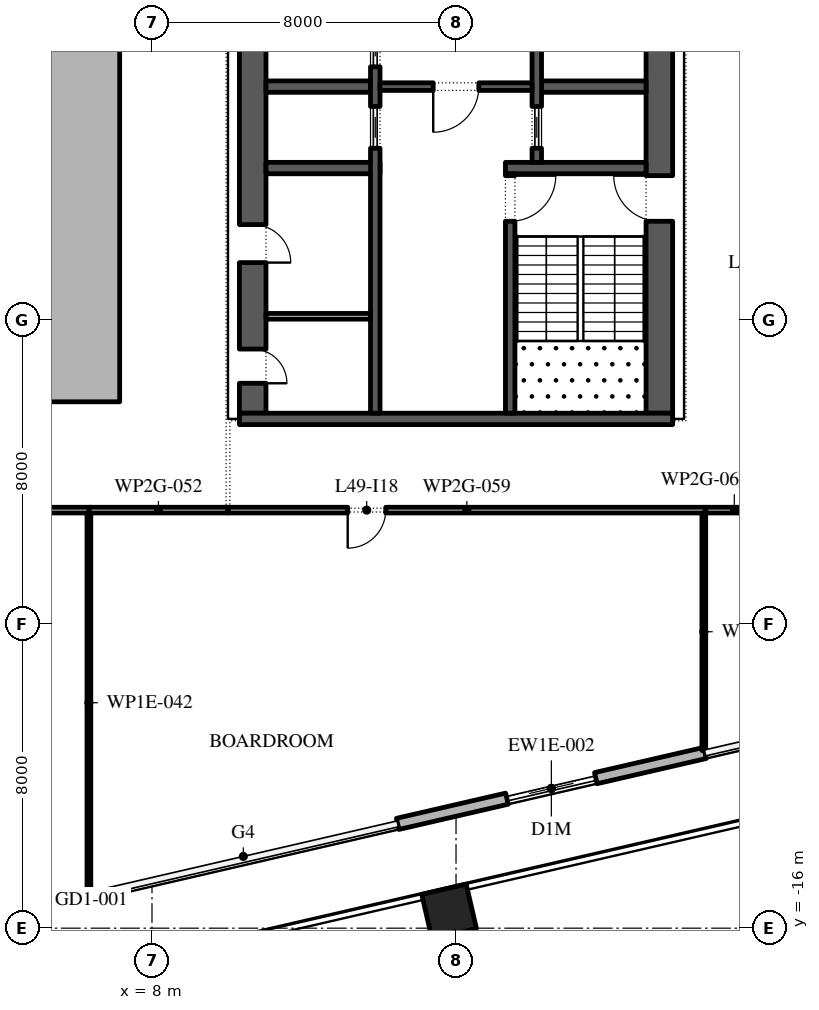
"""IFC4 building model, lengths in metres.
Left out: names, types, materials, properties, quantities, classifications, styles, units other than length and angle.
Written with IfcOpenShell. Run it as: python <this file> out.ifc"""

import sys

from ifc_helpers import new_model, si_unit, direction, frame, frame_2d, origin, origin_2d, place, context, subcontext, project, spatial, polyline, rectangle, outline, extrude, element, fill, save


model = new_model("IFC4")
c1 = context("Model", 3, precision=1e-05, world=origin(), true_north=direction((0.0, 1.0)))
c2 = subcontext(c1, "Body", "Model", "MODEL_VIEW")
j1 = project(units=[si_unit("LENGTHUNIT", "METRE"), si_unit("PLANEANGLEUNIT", "RADIAN")], contexts=[c1])
p1 = place(None, origin())
s1 = spatial("IfcSite", under=j1, at=p1, CompositionType="ELEMENT")
p2 = place(p1, origin())
s2 = spatial("IfcBuilding", under=s1, at=p2, CompositionType="ELEMENT")
p3 = place(p2, frame((0.0, 0.0, 222.0)))
s3 = spatial("IfcBuildingStorey", under=s2, at=p3, CompositionType="ELEMENT", Elevation=222.0)
p4 = place(p3, frame((15.818, -15.561, 0.0), z_axis=(0.0, 0.0, 1.0), x_axis=(0.974370064785, 0.224951054344, 0.0)))
e1 = element("IfcColumn", 1, at=p4, inside=s3, PredefinedType="COLUMN", context=c2, shape_type="SweptSolid", body=[
    extrude(rectangle(XDim=1.2, YDim=1.2, at=origin_2d()), origin(), (0.0, 0.0, 1.0), 4.2),
])
p5 = place(p3, origin())
e2 = element("IfcWall", 2, at=p5, inside=s3, PredefinedType="STANDARD", context=c2, shape_type="SweptSolid", body=[
    extrude(outline(polyline([(-7.15, -2.15), (7.15, -2.15), (7.15, 16.15), (-7.15, 16.15), (-7.15, -2.15)]), holes=[polyline([(-7.0, -2.0), (-7.0, 16.0), (7.0, 16.0), (7.0, -2.0), (-7.0, -2.0)])]), origin(), (0.0, 0.0, 1.0), 3.75),
])
p6 = place(p3, frame((14.465, -13.256, 0.0), z_axis=(0.0, 0.0, 1.0), x_axis=(0.974368386566, 0.224958323385, 0.0)))
e3 = element("IfcWall", 3, at=p6, inside=s3, PredefinedType="STANDARD", context=c2, shape_type="SweptSolid", body=[
    extrude(rectangle(XDim=8.3, YDim=0.3, at=frame_2d((4.15, 0.0))), origin(), (0.0, 0.0, 1.0), 3.75),
])
p7 = place(p6, frame((2.95, 0.0, 0.0)))
e4 = element("IfcOpeningElement", 4, at=p7, cuts=e3, PredefinedType="OPENING", context=c2, shape_type="SweptSolid", body=[
    extrude(rectangle(XDim=2.4, YDim=3.025, at=frame_2d((1.2, 1.512))), frame((0.0, 0.16, 0.0), z_axis=(0.0, -1.0, 0.0), x_axis=(1.0, 0.0, 0.0)), (0.0, 0.0, 1.0), 0.32),
])
p8 = place(p3, frame((33.157, -5.092, 0.0), z_axis=(0.0, 0.0, 1.0), x_axis=(-0.224950279389, 0.974370243697, 0.0)))
e5 = element("IfcWall", 5, at=p8, inside=s3, PredefinedType="STANDARD", context=c2, shape_type="SweptSolid", body=[
    extrude(rectangle(XDim=49.5, YDim=0.3, at=frame_2d((24.75, 0.0))), origin(), (0.0, 0.0, 1.0), 3.75),
])
p9 = place(p8, frame((2.207, 0.0, 0.0)))
e6 = element("IfcOpeningElement", 6, at=p9, cuts=e5, PredefinedType="OPENING", context=c2, shape_type="SweptSolid", body=[
    extrude(rectangle(XDim=2.4, YDim=2.875, at=frame_2d((1.2, 1.438))), frame((0.0, 0.16, 0.0), z_axis=(0.0, -1.0, 0.0), x_axis=(1.0, 0.0, 0.0)), (0.0, 0.0, 1.0), 0.32),
])
p10 = place(p8, frame((7.871, 0.0, 0.45)))
e7 = element("IfcOpeningElement", 7, at=p10, cuts=e5, PredefinedType="OPENING", context=c2, shape_type="SweptSolid", body=[
    extrude(rectangle(XDim=5.0, YDim=2.575, at=frame_2d((2.5, 1.288))), frame((0.0, 0.16, 0.0), z_axis=(0.0, -1.0, 0.0), x_axis=(1.0, 0.0, 0.0)), (0.0, 0.0, 1.0), 0.32),
])
p11 = place(p8, frame((14.986, 0.0, 0.45)))
e8 = element("IfcOpeningElement", 8, at=p11, cuts=e5, PredefinedType="OPENING", context=c2, shape_type="SweptSolid", body=[
    extrude(rectangle(XDim=5.0, YDim=2.625, at=frame_2d((2.5, 1.312))), frame((0.0, 0.16, 0.0), z_axis=(0.0, -1.0, 0.0), x_axis=(1.0, 0.0, 0.0)), (0.0, 0.0, 1.0), 0.32),
])
p12 = place(p8, frame((22.1, 0.0, 0.45)))
e9 = element("IfcOpeningElement", 9, at=p12, cuts=e5, PredefinedType="OPENING", context=c2, shape_type="SweptSolid", body=[
    extrude(rectangle(XDim=5.0, YDim=2.75, at=frame_2d((2.5, 1.375))), frame((0.0, 0.16, 0.0), z_axis=(0.0, -1.0, 0.0), x_axis=(1.0, 0.0, 0.0)), (0.0, 0.0, 1.0), 0.32),
])
p13 = place(p8, frame((30.514, 0.0, 0.0)))
e10 = element("IfcOpeningElement", 10, at=p13, cuts=e5, PredefinedType="OPENING", context=c2, shape_type="SweptSolid", body=[
    extrude(rectangle(XDim=2.4, YDim=3.2, at=frame_2d((1.2, 1.6))), frame((0.0, 0.16, 0.0), z_axis=(0.0, -1.0, 0.0), x_axis=(1.0, 0.0, 0.0)), (0.0, 0.0, 1.0), 0.32),
])
p14 = place(p8, frame((36.329, 0.0, 0.45)))
e11 = element("IfcOpeningElement", 11, at=p14, cuts=e5, PredefinedType="OPENING", context=c2, shape_type="SweptSolid", body=[
    extrude(rectangle(XDim=5.0, YDim=3.25, at=frame_2d((2.5, 1.625))), frame((0.0, 0.16, 0.0), z_axis=(0.0, -1.0, 0.0), x_axis=(1.0, 0.0, 0.0)), (0.0, 0.0, 1.0), 0.32),
])
p15 = place(p8, frame((43.443, 0.0, 0.45)))
e12 = element("IfcOpeningElement", 12, at=p15, cuts=e5, PredefinedType="OPENING", context=c2, shape_type="SweptSolid", body=[
    extrude(rectangle(XDim=5.0, YDim=3.25, at=frame_2d((2.5, 1.625))), frame((0.0, 0.16, 0.0), z_axis=(0.0, -1.0, 0.0), x_axis=(1.0, 0.0, 0.0)), (0.0, 0.0, 1.0), 0.32),
])
p16 = place(p3, frame((21.35, -2.45, 0.0), z_axis=(0.0, 0.0, 1.0), x_axis=(0.0, 1.0, 0.0)))
e13 = element("IfcWall", 13, at=p16, inside=s3, PredefinedType="SHEAR", context=c2, shape_type="SweptSolid", body=[
    extrude(rectangle(XDim=27.9, YDim=0.7, at=frame_2d((13.95, 0.0))), origin(), (0.0, 0.0, 1.0), 3.75),
])
p17 = place(p16, frame((5.05, 0.0, 0.0)))
e14 = element("IfcOpeningElement", 14, at=p17, cuts=e13, PredefinedType="OPENING", context=c2, shape_type="SweptSolid", body=[
    extrude(rectangle(XDim=1.2, YDim=2.1, at=frame_2d((0.6, 1.05))), frame((0.0, 0.36, 0.0), z_axis=(0.0, -1.0, 0.0), x_axis=(1.0, 0.0, 0.0)), (0.0, 0.0, 1.0), 0.72),
])
p18 = place(p16, frame((21.65, 0.0, 0.0)))
e15 = element("IfcOpeningElement", 15, at=p18, cuts=e13, PredefinedType="OPENING", context=c2, shape_type="SweptSolid", body=[
    extrude(rectangle(XDim=1.2, YDim=2.1, at=frame_2d((0.6, 1.05))), frame((0.0, 0.36, 0.0), z_axis=(0.0, -1.0, 0.0), x_axis=(1.0, 0.0, 0.0)), (0.0, 0.0, 1.0), 0.72),
])
p19 = place(p3, frame((10.65, -2.45, 0.0), z_axis=(0.0, 0.0, 1.0), x_axis=(0.0, 1.0, 0.0)))
e16 = element("IfcWall", 16, at=p19, inside=s3, PredefinedType="SHEAR", context=c2, shape_type="SweptSolid", body=[
    extrude(rectangle(XDim=27.9, YDim=0.7, at=frame_2d((13.95, 0.0))), origin(), (0.0, 0.0, 1.0), 3.75),
])
p20 = place(p19, frame((23.65, 0.0, 0.0)))
e17 = element("IfcOpeningElement", 17, at=p20, cuts=e16, PredefinedType="OPENING", context=c2, shape_type="SweptSolid", body=[
    extrude(rectangle(XDim=2.4, YDim=2.1, at=frame_2d((1.2, 1.05))), frame((0.0, 0.36, 0.0), z_axis=(0.0, -1.0, 0.0), x_axis=(1.0, 0.0, 0.0)), (0.0, 0.0, 1.0), 0.72),
])
p21 = place(p19, frame((0.788, 0.0, 0.0)))
e18 = element("IfcOpeningElement", 18, at=p21, cuts=e16, PredefinedType="OPENING", context=c2, shape_type="SweptSolid", body=[
    extrude(rectangle(XDim=0.9, YDim=2.1, at=frame_2d((0.45, 1.05))), frame((0.0, 0.36, 0.0), z_axis=(0.0, -1.0, 0.0), x_axis=(1.0, 0.0, 0.0)), (0.0, 0.0, 1.0), 0.72),
])
p22 = place(p19, frame((3.962, 0.0, 0.0)))
e19 = element("IfcOpeningElement", 19, at=p22, cuts=e16, PredefinedType="OPENING", context=c2, shape_type="SweptSolid", body=[
    extrude(rectangle(XDim=1.0, YDim=2.1, at=frame_2d((0.5, 1.05))), frame((0.0, 0.36, 0.0), z_axis=(0.0, -1.0, 0.0), x_axis=(1.0, 0.0, 0.0)), (0.0, 0.0, 1.0), 0.72),
])
p23 = place(p3, frame((10.3, -2.6, 0.0), z_axis=(0.0, 0.0, 1.0), x_axis=(1.0, 0.0, 0.0)))
e20 = element("IfcWall", 20, at=p23, inside=s3, PredefinedType="SHEAR", context=c2, shape_type="SweptSolid", body=[
    extrude(rectangle(XDim=11.4, YDim=0.3, at=frame_2d((5.7, 0.0))), origin(), (0.0, 0.0, 1.0), 3.75),
])
p24 = place(p3, frame((17.3, 4.0, 0.0), z_axis=(0.0, 0.0, 1.0), x_axis=(1.0, 0.0, 0.0)))
e21 = element("IfcWall", 21, at=p24, inside=s3, PredefinedType="SHEAR", context=c2, shape_type="SweptSolid", body=[
    extrude(rectangle(XDim=3.7, YDim=0.3, at=frame_2d((1.85, 0.0))), origin(), (0.0, 0.0, 1.0), 3.75),
])
p25 = place(p3, frame((17.425, -2.45, 0.0), z_axis=(0.0, 0.0, 1.0), x_axis=(0.0, 1.0, 0.0)))
e22 = element("IfcWall", 22, at=p25, inside=s3, PredefinedType="SHEAR", context=c2, shape_type="SweptSolid", body=[
    extrude(rectangle(XDim=6.3, YDim=0.25, at=frame_2d((3.15, 0.0))), origin(), (0.0, 0.0, 1.0), 3.75),
])
p26 = place(p25, frame((5.05, 0.0, 0.0)))
e23 = element("IfcOpeningElement", 23, at=p26, cuts=e22, PredefinedType="OPENING", context=c2, shape_type="SweptSolid", body=[
    extrude(rectangle(XDim=1.2, YDim=2.1, at=frame_2d((0.6, 1.05))), frame((0.0, 0.135, 0.0), z_axis=(0.0, -1.0, 0.0), x_axis=(1.0, 0.0, 0.0)), (0.0, 0.0, 1.0), 0.27),
])
p27 = place(p3, frame((18.25, 6.143, 0.0), z_axis=(0.0, 0.0, 1.0), x_axis=(1.0, 0.0, 0.0)))
e24 = element("IfcWall", 24, at=p27, inside=s3, PredefinedType="SHEAR", context=c2, shape_type="SweptSolid", body=[
    extrude(rectangle(XDim=2.75, YDim=0.3, at=frame_2d((1.375, 0.0))), origin(), (0.0, 0.0, 1.0), 3.75),
])
p28 = place(p3, frame((18.125, 4.15, 0.0), z_axis=(0.0, 0.0, 1.0), x_axis=(0.0, 1.0, 0.0)))
e25 = element("IfcWall", 25, at=p28, inside=s3, PredefinedType="SHEAR", context=c2, shape_type="SweptSolid", body=[
    extrude(rectangle(XDim=14.7, YDim=0.25, at=frame_2d((7.35, 0.0))), origin(), (0.0, 0.0, 1.0), 3.75),
])
p29 = place(p28, frame((4.296, 0.0, 0.0)))
e26 = element("IfcOpeningElement", 26, at=p29, cuts=e25, PredefinedType="OPENING", context=c2, shape_type="SweptSolid", body=[
    extrude(rectangle(XDim=0.9, YDim=2.1, at=frame_2d((0.45, 1.05))), frame((0.0, 0.135, 0.0), z_axis=(0.0, -1.0, 0.0), x_axis=(1.0, 0.0, 0.0)), (0.0, 0.0, 1.0), 0.27),
])
p30 = place(p28, frame((9.504, 0.0, 0.0)))
e27 = element("IfcOpeningElement", 27, at=p30, cuts=e25, PredefinedType="OPENING", context=c2, shape_type="SweptSolid", body=[
    extrude(rectangle(XDim=0.9, YDim=2.1, at=frame_2d((0.45, 1.05))), frame((0.0, 0.135, 0.0), z_axis=(0.0, -1.0, 0.0), x_axis=(1.0, 0.0, 0.0)), (0.0, 0.0, 1.0), 0.27),
])
p31 = place(p28, frame((0.371, 0.0, 0.0)))
e28 = element("IfcOpeningElement", 28, at=p31, cuts=e25, PredefinedType="OPENING", context=c2, shape_type="SweptSolid", body=[
    extrude(rectangle(XDim=1.1, YDim=2.1, at=frame_2d((0.55, 1.05))), frame((0.0, 0.135, 0.0), z_axis=(0.0, -1.0, 0.0), x_axis=(1.0, 0.0, 0.0)), (0.0, 0.0, 1.0), 0.27),
])
p32 = place(p28, frame((13.229, 0.0, 0.0)))
e29 = element("IfcOpeningElement", 29, at=p32, cuts=e25, PredefinedType="OPENING", context=c2, shape_type="SweptSolid", body=[
    extrude(rectangle(XDim=1.1, YDim=2.1, at=frame_2d((0.55, 1.05))), frame((0.0, 0.135, 0.0), z_axis=(0.0, -1.0, 0.0), x_axis=(1.0, 0.0, 0.0)), (0.0, 0.0, 1.0), 0.27),
])
p33 = place(p3, frame((11.0, 4.0, 0.0), z_axis=(0.0, 0.0, 1.0), x_axis=(1.0, 0.0, 0.0)))
e30 = element("IfcWall", 30, at=p33, inside=s3, PredefinedType="SHEAR", context=c2, shape_type="SweptSolid", body=[
    extrude(rectangle(XDim=3.0, YDim=0.3, at=frame_2d((1.5, 0.0))), origin(), (0.0, 0.0, 1.0), 3.75),
])
p34 = place(p3, frame((11.0, 6.143, 0.0), z_axis=(0.0, 0.0, 1.0), x_axis=(1.0, 0.0, 0.0)))
e31 = element("IfcWall", 31, at=p34, inside=s3, PredefinedType="SHEAR", context=c2, shape_type="SweptSolid", body=[
    extrude(rectangle(XDim=2.75, YDim=0.3, at=frame_2d((1.375, 0.0))), origin(), (0.0, 0.0, 1.0), 3.75),
])
p35 = place(p3, frame((13.875, -2.45, 0.0), z_axis=(0.0, 0.0, 1.0), x_axis=(0.0, 1.0, 0.0)))
e32 = element("IfcWall", 32, at=p35, inside=s3, PredefinedType="SHEAR", context=c2, shape_type="SweptSolid", body=[
    extrude(rectangle(XDim=21.3, YDim=0.25, at=frame_2d((10.65, 0.0))), origin(), (0.0, 0.0, 1.0), 3.75),
])
p36 = place(p35, frame((17.786, 0.0, 0.0)))
e33 = element("IfcOpeningElement", 33, at=p36, cuts=e32, PredefinedType="OPENING", context=c2, shape_type="SweptSolid", body=[
    extrude(rectangle(XDim=0.9, YDim=2.1, at=frame_2d((0.45, 1.05))), frame((0.0, 0.135, 0.0), z_axis=(0.0, -1.0, 0.0), x_axis=(1.0, 0.0, 0.0)), (0.0, 0.0, 1.0), 0.27),
])
p37 = place(p35, frame((6.971, 0.0, 0.0)))
e34 = element("IfcOpeningElement", 34, at=p37, cuts=e32, PredefinedType="OPENING", context=c2, shape_type="SweptSolid", body=[
    extrude(rectangle(XDim=1.1, YDim=2.1, at=frame_2d((0.55, 1.05))), frame((0.0, 0.135, 0.0), z_axis=(0.0, -1.0, 0.0), x_axis=(1.0, 0.0, 0.0)), (0.0, 0.0, 1.0), 0.27),
])
p38 = place(p35, frame((9.114, 0.0, 0.0)))
e35 = element("IfcOpeningElement", 35, at=p38, cuts=e32, PredefinedType="OPENING", context=c2, shape_type="SweptSolid", body=[
    extrude(rectangle(XDim=1.1, YDim=2.1, at=frame_2d((0.55, 1.05))), frame((0.0, 0.135, 0.0), z_axis=(0.0, -1.0, 0.0), x_axis=(1.0, 0.0, 0.0)), (0.0, 0.0, 1.0), 0.27),
])
p39 = place(p35, frame((11.257, 0.0, 0.0)))
e36 = element("IfcOpeningElement", 36, at=p39, cuts=e32, PredefinedType="OPENING", context=c2, shape_type="SweptSolid", body=[
    extrude(rectangle(XDim=1.1, YDim=2.1, at=frame_2d((0.55, 1.05))), frame((0.0, 0.135, 0.0), z_axis=(0.0, -1.0, 0.0), x_axis=(1.0, 0.0, 0.0)), (0.0, 0.0, 1.0), 0.27),
])
p40 = place(p35, frame((13.4, 0.0, 0.0)))
e37 = element("IfcOpeningElement", 37, at=p40, cuts=e32, PredefinedType="OPENING", context=c2, shape_type="SweptSolid", body=[
    extrude(rectangle(XDim=1.1, YDim=2.1, at=frame_2d((0.55, 1.05))), frame((0.0, 0.135, 0.0), z_axis=(0.0, -1.0, 0.0), x_axis=(1.0, 0.0, 0.0)), (0.0, 0.0, 1.0), 0.27),
])
p41 = place(p3, frame((14.0, 6.143, 0.0), z_axis=(0.0, 0.0, 1.0), x_axis=(1.0, 0.0, 0.0)))
e38 = element("IfcWall", 38, at=p41, inside=s3, PredefinedType="SHEAR", context=c2, shape_type="SweptSolid", body=[
    extrude(rectangle(XDim=4.0, YDim=0.2, at=frame_2d((2.0, 0.0))), origin(), (0.0, 0.0, 1.0), 3.75),
])
p42 = place(p41, frame((1.4, 0.0, 0.0)))
e39 = element("IfcOpeningElement", 39, at=p42, cuts=e38, PredefinedType="OPENING", context=c2, shape_type="SweptSolid", body=[
    extrude(rectangle(XDim=1.2, YDim=2.1, at=frame_2d((0.6, 1.05))), frame((0.0, 0.11, 0.0), z_axis=(0.0, -1.0, 0.0), x_axis=(1.0, 0.0, 0.0)), (0.0, 0.0, 1.0), 0.22),
])
p43 = place(p3, frame((11.0, 0.1, 0.0), z_axis=(0.0, 0.0, 1.0), x_axis=(1.0, 0.0, 0.0)))
e40 = element("IfcWall", 40, at=p43, inside=s3, PredefinedType="PARTITIONING", context=c2, shape_type="SweptSolid", body=[
    extrude(rectangle(XDim=2.75, YDim=0.15, at=frame_2d((1.375, 0.0))), origin(), (0.0, 0.0, 1.0), 3.75),
])
p44 = place(p3, frame((6.39, -5.0, 0.0), z_axis=(0.0, 0.0, 1.0), x_axis=(-1.0, 0.0, 0.0)))
e41 = element("IfcWall", 41, at=p44, inside=s3, PredefinedType="PARTITIONING", context=c2, shape_type="SweptSolid", body=[
    extrude(rectangle(XDim=5.215, YDim=0.15, at=frame_2d((2.607, 0.0))), origin(), (0.0, 0.0, 1.0), 3.75),
])
p45 = place(p3, frame((6.34, -5.075, 0.0), z_axis=(0.0, 0.0, 1.0), x_axis=(0.0, -1.0, 0.0)))
e42 = element("IfcWall", 42, at=p45, inside=s3, PredefinedType="PARTITIONING", context=c2, shape_type="SweptSolid", body=[
    extrude(rectangle(XDim=9.986, YDim=0.1, at=frame_2d((4.993, 0.0))), origin(), (0.0, 0.0, 1.0), 3.75),
])
p46 = place(p3, frame((10.0, -5.0, 0.0), z_axis=(0.0, 0.0, 1.0), x_axis=(-1.0, 0.0, 0.0)))
e43 = element("IfcWall", 43, at=p46, inside=s3, PredefinedType="PARTITIONING", context=c2, shape_type="SweptSolid", body=[
    extrude(rectangle(XDim=3.66, YDim=0.15, at=frame_2d((1.83, 0.0))), origin(), (0.0, 0.0, 1.0), 3.75),
])
p47 = place(p3, frame((22.57, -5.0, 0.0), z_axis=(0.0, 0.0, 1.0), x_axis=(-1.0, 0.0, 0.0)))
e44 = element("IfcWall", 44, at=p47, inside=s3, PredefinedType="PARTITIONING", context=c2, shape_type="SweptSolid", body=[
    extrude(rectangle(XDim=12.57, YDim=0.15, at=frame_2d((6.285, 0.0))), origin(), (0.0, 0.0, 1.0), 3.75),
])
p48 = place(p47, frame((8.42, 0.0, 0.0)))
e45 = element("IfcOpeningElement", 45, at=p48, cuts=e44, PredefinedType="OPENING", context=c2, shape_type="SweptSolid", body=[
    extrude(rectangle(XDim=1.0, YDim=2.1, at=frame_2d((0.5, 1.05))), frame((0.0, 0.085, 0.0), z_axis=(0.0, -1.0, 0.0), x_axis=(1.0, 0.0, 0.0)), (0.0, 0.0, 1.0), 0.17),
])
p49 = place(p3, frame((22.52, -5.075, 0.0), z_axis=(0.0, 0.0, 1.0), x_axis=(0.0, -1.0, 0.0)))
e46 = element("IfcWall", 46, at=p49, inside=s3, PredefinedType="PARTITIONING", context=c2, shape_type="SweptSolid", body=[
    extrude(rectangle(XDim=6.25, YDim=0.1, at=frame_2d((3.125, 0.0))), origin(), (0.0, 0.0, 1.0), 3.75),
])
p50 = place(p3, frame((24.075, -5.0, 0.0), z_axis=(0.0, 0.0, 1.0), x_axis=(-1.0, 0.0, 0.0)))
e47 = element("IfcWall", 47, at=p50, inside=s3, PredefinedType="PARTITIONING", context=c2, shape_type="SweptSolid", body=[
    extrude(rectangle(XDim=1.505, YDim=0.15, at=frame_2d((0.752, 0.0))), origin(), (0.0, 0.0, 1.0), 3.75),
])
p51 = place(p7, origin())
e48 = element("IfcDoor", 48, at=p51, inside=s3, OperationType="DOUBLE_DOOR_SLIDING", PredefinedType="DOOR", context=c2, shape_type="SweptSolid", body=[
    extrude(rectangle(XDim=2.4, YDim=3.025, at=frame_2d((1.2, 1.512))), frame((0.0, 0.025, 0.0), z_axis=(0.0, -1.0, 0.0), x_axis=(1.0, 0.0, 0.0)), (0.0, 0.0, 1.0), 0.05),
])
fill(e4, e48)
p52 = place(p31, origin())
e49 = element("IfcDoor", 49, at=p52, inside=s3, OperationType="SLIDING_TO_LEFT", PredefinedType="DOOR", context=c2, shape_type="SweptSolid", body=[
    extrude(rectangle(XDim=1.1, YDim=2.1, at=frame_2d((0.55, 1.05))), frame((0.0, 0.025, 0.0), z_axis=(0.0, -1.0, 0.0), x_axis=(1.0, 0.0, 0.0)), (0.0, 0.0, 1.0), 0.05),
])
fill(e28, e49)
p53 = place(p37, origin())
e50 = element("IfcDoor", 50, at=p53, inside=s3, OperationType="SLIDING_TO_LEFT", PredefinedType="DOOR", context=c2, shape_type="SweptSolid", body=[
    extrude(rectangle(XDim=1.1, YDim=2.1, at=frame_2d((0.55, 1.05))), frame((0.0, 0.025, 0.0), z_axis=(0.0, -1.0, 0.0), x_axis=(1.0, 0.0, 0.0)), (0.0, 0.0, 1.0), 0.05),
])
fill(e34, e50)
p54 = place(p38, origin())
e51 = element("IfcDoor", 51, at=p54, inside=s3, OperationType="SLIDING_TO_LEFT", PredefinedType="DOOR", context=c2, shape_type="SweptSolid", body=[
    extrude(rectangle(XDim=1.1, YDim=2.1, at=frame_2d((0.55, 1.05))), frame((0.0, 0.025, 0.0), z_axis=(0.0, -1.0, 0.0), x_axis=(1.0, 0.0, 0.0)), (0.0, 0.0, 1.0), 0.05),
])
fill(e35, e51)
p55 = place(p42, frame((1.2, 0.0, 0.0), z_axis=(0.0, 0.0, 1.0), x_axis=(-1.0, 0.0, 0.0)))
e52 = element("IfcDoor", 52, at=p55, inside=s3, OperationType="SINGLE_SWING_LEFT", PredefinedType="DOOR", context=c2, shape_type="SweptSolid", body=[
    extrude(rectangle(XDim=1.2, YDim=2.1, at=frame_2d((0.6, 1.05))), frame((0.0, 0.025, 0.0), z_axis=(0.0, -1.0, 0.0), x_axis=(1.0, 0.0, 0.0)), (0.0, 0.0, 1.0), 0.05),
])
fill(e39, e52)
p56 = place(p26, frame((1.2, 0.0, 0.0), z_axis=(0.0, 0.0, 1.0), x_axis=(-1.0, 0.0, 0.0)))
e53 = element("IfcDoor", 53, at=p56, inside=s3, OperationType="SINGLE_SWING_RIGHT", PredefinedType="DOOR", context=c2, shape_type="SweptSolid", body=[
    extrude(rectangle(XDim=1.2, YDim=2.1, at=frame_2d((0.6, 1.05))), frame((0.0, 0.025, 0.0), z_axis=(0.0, -1.0, 0.0), x_axis=(1.0, 0.0, 0.0)), (0.0, 0.0, 1.0), 0.05),
])
fill(e23, e53)
p57 = place(p17, origin())
e54 = element("IfcDoor", 54, at=p57, inside=s3, OperationType="SINGLE_SWING_LEFT", PredefinedType="DOOR", context=c2, shape_type="SweptSolid", body=[
    extrude(rectangle(XDim=1.2, YDim=2.1, at=frame_2d((0.6, 1.05))), frame((0.0, 0.025, 0.0), z_axis=(0.0, -1.0, 0.0), x_axis=(1.0, 0.0, 0.0)), (0.0, 0.0, 1.0), 0.05),
])
fill(e14, e54)
p58 = place(p21, frame((0.9, -0.65, 0.0), z_axis=(0.0, 0.0, 1.0), x_axis=(-1.0, 0.0, 0.0)))
e55 = element("IfcDoor", 55, at=p58, inside=s3, OperationType="SINGLE_SWING_LEFT", PredefinedType="DOOR", context=c2, shape_type="SweptSolid", body=[
    extrude(rectangle(XDim=0.9, YDim=2.1, at=frame_2d((0.45, 1.05))), frame((0.0, -0.3, 0.0), z_axis=(0.0, -1.0, 0.0), x_axis=(1.0, 0.0, 0.0)), (0.0, 0.0, 1.0), 0.05),
])
fill(e18, e55)
p59 = place(p22, frame((1.0, -0.65, 0.0), z_axis=(0.0, 0.0, 1.0), x_axis=(-1.0, 0.0, 0.0)))
e56 = element("IfcDoor", 56, at=p59, inside=s3, OperationType="SINGLE_SWING_LEFT", PredefinedType="DOOR", context=c2, shape_type="SweptSolid", body=[
    extrude(rectangle(XDim=1.0, YDim=2.1, at=frame_2d((0.5, 1.05))), frame((0.0, -0.3, 0.0), z_axis=(0.0, -1.0, 0.0), x_axis=(1.0, 0.0, 0.0)), (0.0, 0.0, 1.0), 0.05),
])
fill(e19, e56)
p60 = place(p48, origin())
e57 = element("IfcDoor", 57, at=p60, inside=s3, OperationType="SINGLE_SWING_LEFT", PredefinedType="DOOR", context=c2, shape_type="SweptSolid", body=[
    extrude(rectangle(XDim=1.0, YDim=2.1, at=frame_2d((0.5, 1.05))), frame((0.0, 0.025, 0.0), z_axis=(0.0, -1.0, 0.0), x_axis=(1.0, 0.0, 0.0)), (0.0, 0.0, 1.0), 0.05),
])
fill(e45, e57)
save(model, sys.argv[1])
